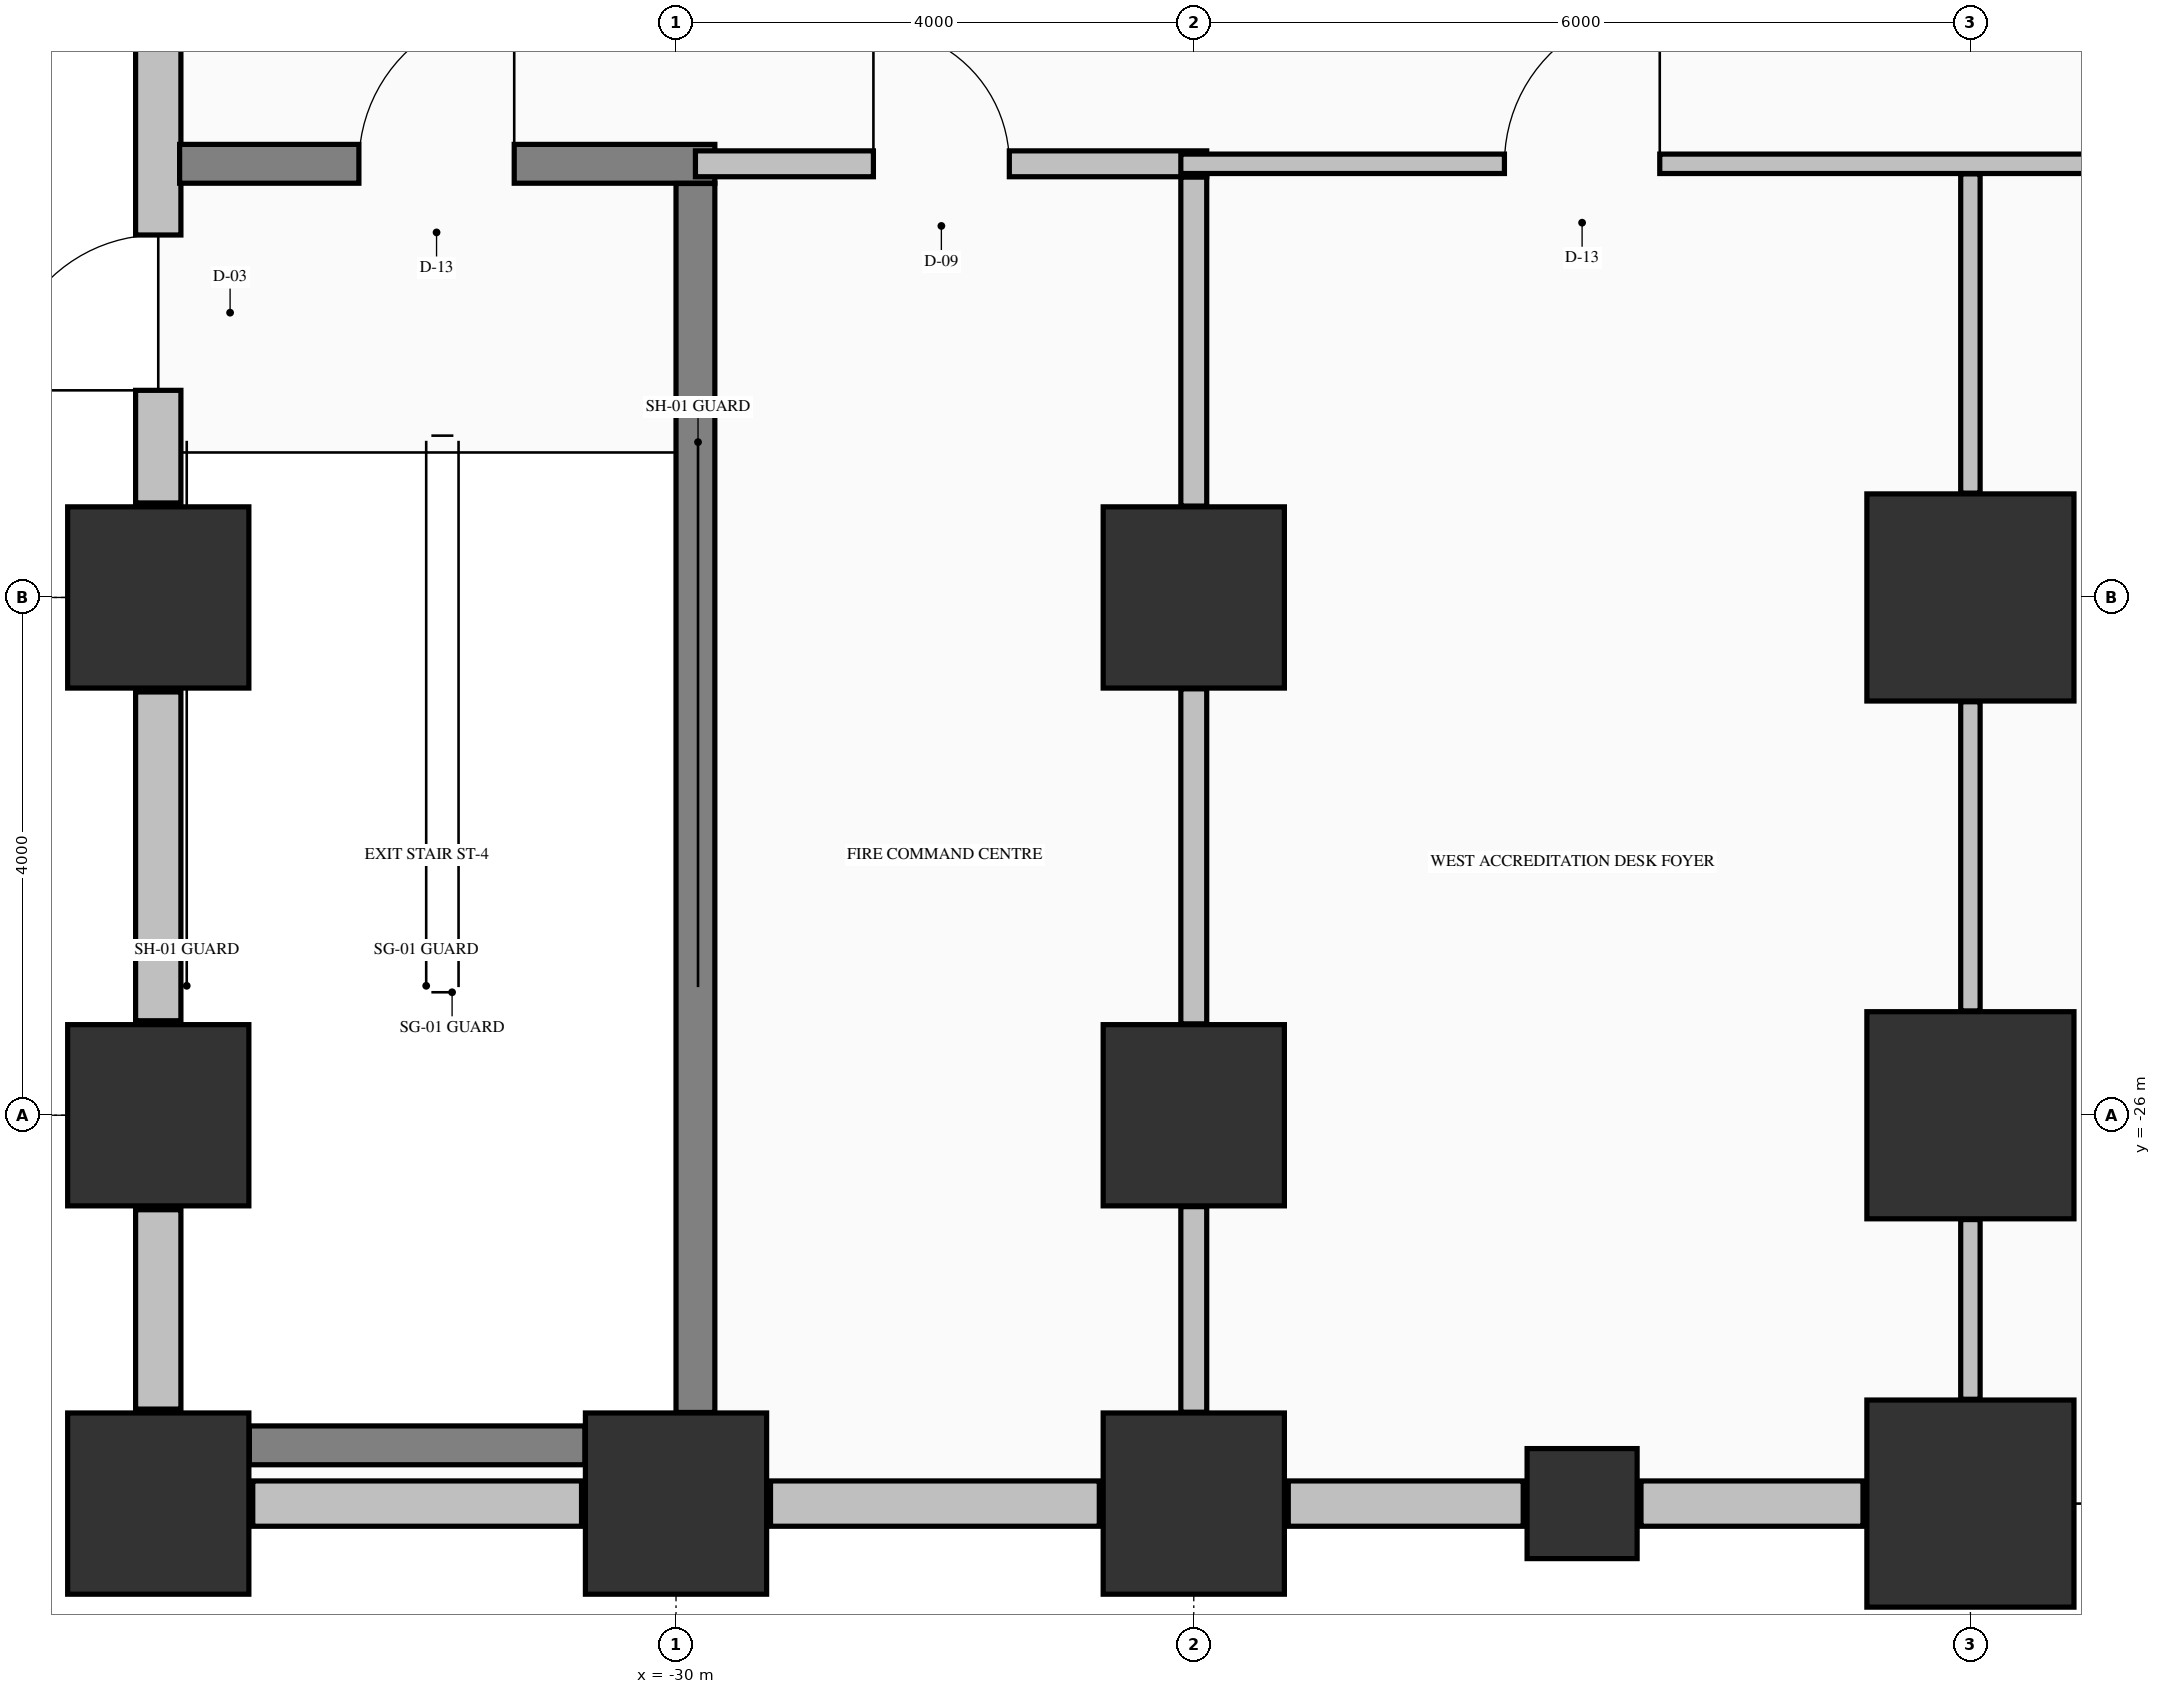
"""IFC4 building model, lengths in metres.
Left out: names, types, materials, properties, quantities, classifications, styles, units other than length and angle.
Written with IfcOpenShell. Run it as: python <this file> out.ifc"""

import sys

from ifc_helpers import new_model, si_unit, direction, frame, frame_2d, origin, origin_2d, place, context, subcontext, project, spatial, rectangle, extrude, element, fill, save


model = new_model("IFC4")
c1 = context("Model", 3, precision=1e-05, world=origin(), true_north=direction((0.0, 1.0)))
c2 = subcontext(c1, "Body", "Model", "MODEL_VIEW")
j1 = project(units=[si_unit("LENGTHUNIT", "METRE"), si_unit("PLANEANGLEUNIT", "RADIAN")], contexts=[c1])
p1 = place(None, origin())
s1 = spatial("IfcSite", under=j1, at=p1, CompositionType="ELEMENT")
p2 = place(p1, origin())
s2 = spatial("IfcBuilding", under=s1, at=p2, CompositionType="ELEMENT")
p3 = place(p2, origin())
s3 = spatial("IfcBuildingStorey", under=s2, at=p3, CompositionType="ELEMENT", Elevation=0.0)
for number, where, z_axis, x_axis in (
    (1, (-34.0, -29.0, 0.0), (0.0, 0.0, 1.0), (1.0, 0.0, 0.0)),
    (2, (-34.0, -26.0, 0.0), (0.0, 0.0, 1.0), (1.0, 0.0, 0.0)),
    (3, (-34.0, -22.0, 0.0), (0.0, 0.0, 1.0), (1.0, 0.0, 0.0)),
    (4, (-30.0, -29.0, 0.0), (0.0, 0.0, 1.0), (1.0, 0.0, 0.0)),
    (5, (-26.0, -29.0, 0.0), (0.0, 0.0, 1.0), (1.0, 0.0, 0.0)),
    (6, (-26.0, -26.0, 0.0), (0.0, 0.0, 1.0), (1.0, 0.0, 0.0)),
    (7, (-26.0, -22.0, 0.0), (0.0, 0.0, 1.0), (1.0, 0.0, 0.0)),
):
    element("IfcColumn", number, at=place(p3, frame(where, z_axis=z_axis, x_axis=x_axis)), inside=s3, PredefinedType="COLUMN", context=c2, shape_type="SweptSolid", body=[
        extrude(rectangle(XDim=1.4, YDim=1.4, at=origin_2d()), origin(), (0.0, 0.0, 1.0), 5.09),
    ])
for number, where, z_axis, x_axis in (
    (8, (-20.0, -29.0, 0.0), (0.0, 0.0, 1.0), (1.0, 0.0, 0.0)),
    (9, (-20.0, -26.0, 0.0), (0.0, 0.0, 1.0), (1.0, 0.0, 0.0)),
    (10, (-20.0, -22.0, 0.0), (0.0, 0.0, 1.0), (1.0, 0.0, 0.0)),
):
    element("IfcColumn", number, at=place(p3, frame(where, z_axis=z_axis, x_axis=x_axis)), inside=s3, PredefinedType="COLUMN", context=c2, shape_type="SweptSolid", body=[
        extrude(rectangle(XDim=1.6, YDim=1.6, at=origin_2d()), origin(), (0.0, 0.0, 1.0), 5.09),
    ])
p4 = place(p3, frame((-23.0, -29.0, 0.0), z_axis=(0.0, 0.0, 1.0), x_axis=(1.0, 0.0, 0.0)))
e11 = element("IfcColumn", 11, at=p4, inside=s3, PredefinedType="PILASTER", context=c2, shape_type="SweptSolid", body=[
    extrude(rectangle(XDim=0.85, YDim=0.85, at=origin_2d()), origin(), (0.0, 0.0, 1.0), 5.09),
])
for number, where, z_axis, x_axis in (
    (12, (-33.27, -29.0, 0.0), (0.0, 0.0, 1.0), (1.0, 0.0, 0.0)),
    (13, (-29.27, -29.0, 0.0), (0.0, 0.0, 1.0), (1.0, 0.0, 0.0)),
):
    element("IfcWall", number, at=place(p3, frame(where, z_axis=z_axis, x_axis=x_axis)), inside=s3, PredefinedType="STANDARD", context=c2, shape_type="SweptSolid", body=[
        extrude(rectangle(XDim=2.54, YDim=0.35, at=frame_2d((1.27, 0.0))), origin(), (0.0, 0.0, 1.0), 4.482),
    ])
p5 = place(p3, frame((-25.27, -29.0, 0.0), z_axis=(0.0, 0.0, 1.0), x_axis=(1.0, 0.0, 0.0)))
e14 = element("IfcWall", 14, at=p5, inside=s3, PredefinedType="STANDARD", context=c2, shape_type="SweptSolid", body=[
    extrude(rectangle(XDim=1.815, YDim=0.35, at=frame_2d((0.907, 0.0))), origin(), (0.0, 0.0, 1.0), 4.482),
])
p6 = place(p3, frame((-22.545, -29.0, 0.0), z_axis=(0.0, 0.0, 1.0), x_axis=(1.0, 0.0, 0.0)))
e15 = element("IfcWall", 15, at=p6, inside=s3, PredefinedType="STANDARD", context=c2, shape_type="SweptSolid", body=[
    extrude(rectangle(XDim=1.715, YDim=0.35, at=frame_2d((0.857, 0.0))), origin(), (0.0, 0.0, 1.0), 4.482),
])
p7 = place(p3, frame((-34.0, -28.27, 0.0), z_axis=(0.0, 0.0, 1.0), x_axis=(0.0, 1.0, 0.0)))
e16 = element("IfcWall", 16, at=p7, inside=s3, PredefinedType="STANDARD", context=c2, shape_type="SweptSolid", body=[
    extrude(rectangle(XDim=1.54, YDim=0.35, at=frame_2d((0.77, 0.0))), origin(), (0.0, 0.0, 1.0), 5.09),
])
p8 = place(p3, frame((-34.0, -25.27, 0.0), z_axis=(0.0, 0.0, 1.0), x_axis=(0.0, 1.0, 0.0)))
e17 = element("IfcWall", 17, at=p8, inside=s3, PredefinedType="STANDARD", context=c2, shape_type="SweptSolid", body=[
    extrude(rectangle(XDim=2.54, YDim=0.35, at=frame_2d((1.27, 0.0))), origin(), (0.0, 0.0, 1.0), 5.09),
])
p9 = place(p3, frame((-34.0, -21.27, 0.0), z_axis=(0.0, 0.0, 1.0), x_axis=(0.0, 1.0, 0.0)))
e18 = element("IfcWall", 18, at=p9, inside=s3, PredefinedType="STANDARD", context=c2, shape_type="SweptSolid", body=[
    extrude(rectangle(XDim=4.54, YDim=0.35, at=frame_2d((2.27, 0.0))), origin(), (0.0, 0.0, 1.0), 5.09),
])
p10 = place(p9, frame((0.87, 0.0, 0.0)))
e19 = element("IfcOpeningElement", 19, at=p10, cuts=e18, PredefinedType="OPENING", context=c2, shape_type="SweptSolid", body=[
    extrude(rectangle(XDim=1.2, YDim=2.2, at=frame_2d((0.6, 1.1))), frame((0.0, 0.185, 0.0), z_axis=(0.0, -1.0, 0.0), x_axis=(1.0, 0.0, 0.0)), (0.0, 0.0, 1.0), 0.37),
])
p11 = place(p3, frame((-33.296, -28.55, 0.0), z_axis=(0.0, 0.0, 1.0), x_axis=(1.0, 0.0, 0.0)))
e20 = element("IfcWall", 20, at=p11, inside=s3, PredefinedType="SHEAR", context=c2, shape_type="SweptSolid", body=[
    extrude(rectangle(XDim=2.592, YDim=0.3, at=frame_2d((1.296, 0.0))), origin(), (0.0, 0.0, 1.0), 5.09),
])
p12 = place(p3, frame((-33.835, -18.65, 0.0), z_axis=(0.0, 0.0, 1.0), x_axis=(1.0, 0.0, 0.0)))
e21 = element("IfcWall", 21, at=p12, inside=s3, PredefinedType="SHEAR", context=c2, shape_type="SweptSolid", body=[
    extrude(rectangle(XDim=4.135, YDim=0.3, at=frame_2d((2.067, 0.0))), origin(), (0.0, 0.0, 1.0), 5.09),
])
p13 = place(p12, frame((1.385, 0.0, 0.0)))
e22 = element("IfcOpeningElement", 22, at=p13, cuts=e21, PredefinedType="OPENING", context=c2, shape_type="SweptSolid", body=[
    extrude(rectangle(XDim=1.2, YDim=2.15, at=frame_2d((0.6, 1.075))), frame((0.0, 0.16, 0.0), z_axis=(0.0, -1.0, 0.0), x_axis=(1.0, 0.0, 0.0)), (0.0, 0.0, 1.0), 0.32),
])
p14 = place(p3, frame((-29.85, -18.65, 0.0), z_axis=(0.0, 0.0, 1.0), x_axis=(1.0, 0.0, 0.0)))
e23 = element("IfcWall", 23, at=p14, inside=s3, PredefinedType="PARTITIONING", context=c2, shape_type="SweptSolid", body=[
    extrude(rectangle(XDim=3.95, YDim=0.2, at=frame_2d((1.975, 0.0))), origin(), (0.0, 0.0, 1.0), 5.09),
])
p15 = place(p14, frame((1.375, 0.0, 0.0)))
e24 = element("IfcOpeningElement", 24, at=p15, cuts=e23, PredefinedType="OPENING", context=c2, shape_type="SweptSolid", body=[
    extrude(rectangle(XDim=1.05, YDim=2.15, at=frame_2d((0.525, 1.075))), frame((0.0, 0.11, 0.0), z_axis=(0.0, -1.0, 0.0), x_axis=(1.0, 0.0, 0.0)), (0.0, 0.0, 1.0), 0.22),
])
p16 = place(p3, frame((-26.1, -18.65, 0.0), z_axis=(0.0, 0.0, 1.0), x_axis=(1.0, 0.0, 0.0)))
e25 = element("IfcWall", 25, at=p16, inside=s3, PredefinedType="PARTITIONING", context=c2, shape_type="SweptSolid", body=[
    extrude(rectangle(XDim=17.335, YDim=0.15, at=frame_2d((8.667, 0.0))), origin(), (0.0, 0.0, 1.0), 5.09),
])
p17 = place(p16, frame((2.5, 0.0, 0.0)))
e26 = element("IfcOpeningElement", 26, at=p17, cuts=e25, PredefinedType="OPENING", context=c2, shape_type="SweptSolid", body=[
    extrude(rectangle(XDim=1.2, YDim=2.15, at=frame_2d((0.6, 1.075))), frame((0.0, 0.085, 0.0), z_axis=(0.0, -1.0, 0.0), x_axis=(1.0, 0.0, 0.0)), (0.0, 0.0, 1.0), 0.17),
])
p18 = place(p16, frame((9.9, 0.0, 0.0)))
e27 = element("IfcOpeningElement", 27, at=p18, cuts=e25, PredefinedType="OPENING", context=c2, shape_type="SweptSolid", body=[
    extrude(rectangle(XDim=1.4, YDim=2.2, at=frame_2d((0.7, 1.1))), frame((0.0, 0.085, 0.0), z_axis=(0.0, -1.0, 0.0), x_axis=(1.0, 0.0, 0.0)), (0.0, 0.0, 1.0), 0.17),
])
p19 = place(p16, frame((15.825, 0.0, 0.0)))
e28 = element("IfcOpeningElement", 28, at=p19, cuts=e25, PredefinedType="OPENING", context=c2, shape_type="SweptSolid", body=[
    extrude(rectangle(XDim=0.95, YDim=2.15, at=frame_2d((0.475, 1.075))), frame((0.0, 0.085, 0.0), z_axis=(0.0, -1.0, 0.0), x_axis=(1.0, 0.0, 0.0)), (0.0, 0.0, 1.0), 0.17),
])
p20 = place(p3, frame((-29.85, -28.296, 0.0), z_axis=(0.0, 0.0, 1.0), x_axis=(0.0, 1.0, 0.0)))
e29 = element("IfcWall", 29, at=p20, inside=s3, PredefinedType="SHEAR", context=c2, shape_type="SweptSolid", body=[
    extrude(rectangle(XDim=9.494, YDim=0.3, at=frame_2d((4.747, 0.0))), origin(), (0.0, 0.0, 1.0), 5.09),
])
p21 = place(p3, frame((-26.0, -28.294, 0.0), z_axis=(0.0, 0.0, 1.0), x_axis=(0.0, 1.0, 0.0)))
e30 = element("IfcWall", 30, at=p21, inside=s3, PredefinedType="PARTITIONING", context=c2, shape_type="SweptSolid", body=[
    extrude(rectangle(XDim=1.588, YDim=0.2, at=frame_2d((0.794, 0.0))), origin(), (0.0, 0.0, 1.0), 4.132),
])
p22 = place(p3, frame((-26.0, -25.294, 0.0), z_axis=(0.0, 0.0, 1.0), x_axis=(0.0, 1.0, 0.0)))
e31 = element("IfcWall", 31, at=p22, inside=s3, PredefinedType="PARTITIONING", context=c2, shape_type="SweptSolid", body=[
    extrude(rectangle(XDim=2.588, YDim=0.2, at=frame_2d((1.294, 0.0))), origin(), (0.0, 0.0, 1.0), 4.132),
])
p23 = place(p3, frame((-26.0, -21.294, 0.0), z_axis=(0.0, 0.0, 1.0), x_axis=(0.0, 1.0, 0.0)))
e32 = element("IfcWall", 32, at=p23, inside=s3, PredefinedType="PARTITIONING", context=c2, shape_type="SweptSolid", body=[
    extrude(rectangle(XDim=2.541, YDim=0.2, at=frame_2d((1.271, 0.0))), origin(), (0.0, 0.0, 1.0), 4.132),
])
p24 = place(p3, frame((-20.0, -28.194, 0.0), z_axis=(0.0, 0.0, 1.0), x_axis=(0.0, 1.0, 0.0)))
e33 = element("IfcWall", 33, at=p24, inside=s3, PredefinedType="PARTITIONING", context=c2, shape_type="SweptSolid", body=[
    extrude(rectangle(XDim=1.388, YDim=0.15, at=frame_2d((0.694, 0.0))), origin(), (0.0, 0.0, 1.0), 4.132),
])
p25 = place(p3, frame((-20.0, -25.194, 0.0), z_axis=(0.0, 0.0, 1.0), x_axis=(0.0, 1.0, 0.0)))
e34 = element("IfcWall", 34, at=p25, inside=s3, PredefinedType="PARTITIONING", context=c2, shape_type="SweptSolid", body=[
    extrude(rectangle(XDim=2.388, YDim=0.15, at=frame_2d((1.194, 0.0))), origin(), (0.0, 0.0, 1.0), 4.132),
])
p26 = place(p3, frame((-20.0, -21.194, 0.0), z_axis=(0.0, 0.0, 1.0), x_axis=(0.0, 1.0, 0.0)))
e35 = element("IfcWall", 35, at=p26, inside=s3, PredefinedType="PARTITIONING", context=c2, shape_type="SweptSolid", body=[
    extrude(rectangle(XDim=2.466, YDim=0.15, at=frame_2d((1.233, 0.0))), origin(), (0.0, 0.0, 1.0), 4.132),
])
p27 = place(p10, origin())
e36 = element("IfcDoor", 36, at=p27, inside=s3, OperationType="SINGLE_SWING_LEFT", PredefinedType="DOOR", context=c2, shape_type="SweptSolid", body=[
    extrude(rectangle(XDim=1.2, YDim=2.2, at=frame_2d((0.6, 1.1))), frame((0.0, 0.025, 0.0), z_axis=(0.0, -1.0, 0.0), x_axis=(1.0, 0.0, 0.0)), (0.0, 0.0, 1.0), 0.05),
])
fill(e19, e36)
p28 = place(p13, origin())
e37 = element("IfcDoor", 37, at=p28, inside=s3, OperationType="SINGLE_SWING_RIGHT", PredefinedType="DOOR", context=c2, shape_type="SweptSolid", body=[
    extrude(rectangle(XDim=1.2, YDim=2.15, at=frame_2d((0.6, 1.075))), frame((0.0, 0.025, 0.0), z_axis=(0.0, -1.0, 0.0), x_axis=(1.0, 0.0, 0.0)), (0.0, 0.0, 1.0), 0.05),
])
fill(e22, e37)
p29 = place(p15, origin())
e38 = element("IfcDoor", 38, at=p29, inside=s3, OperationType="SINGLE_SWING_LEFT", PredefinedType="DOOR", context=c2, shape_type="SweptSolid", body=[
    extrude(rectangle(XDim=1.05, YDim=2.15, at=frame_2d((0.525, 1.075))), frame((0.0, 0.025, 0.0), z_axis=(0.0, -1.0, 0.0), x_axis=(1.0, 0.0, 0.0)), (0.0, 0.0, 1.0), 0.05),
])
fill(e24, e38)
p30 = place(p17, origin())
e39 = element("IfcDoor", 39, at=p30, inside=s3, OperationType="SINGLE_SWING_RIGHT", PredefinedType="DOOR", context=c2, shape_type="SweptSolid", body=[
    extrude(rectangle(XDim=1.2, YDim=2.15, at=frame_2d((0.6, 1.075))), frame((0.0, 0.025, 0.0), z_axis=(0.0, -1.0, 0.0), x_axis=(1.0, 0.0, 0.0)), (0.0, 0.0, 1.0), 0.05),
])
fill(e26, e39)
save(model, sys.argv[1])
